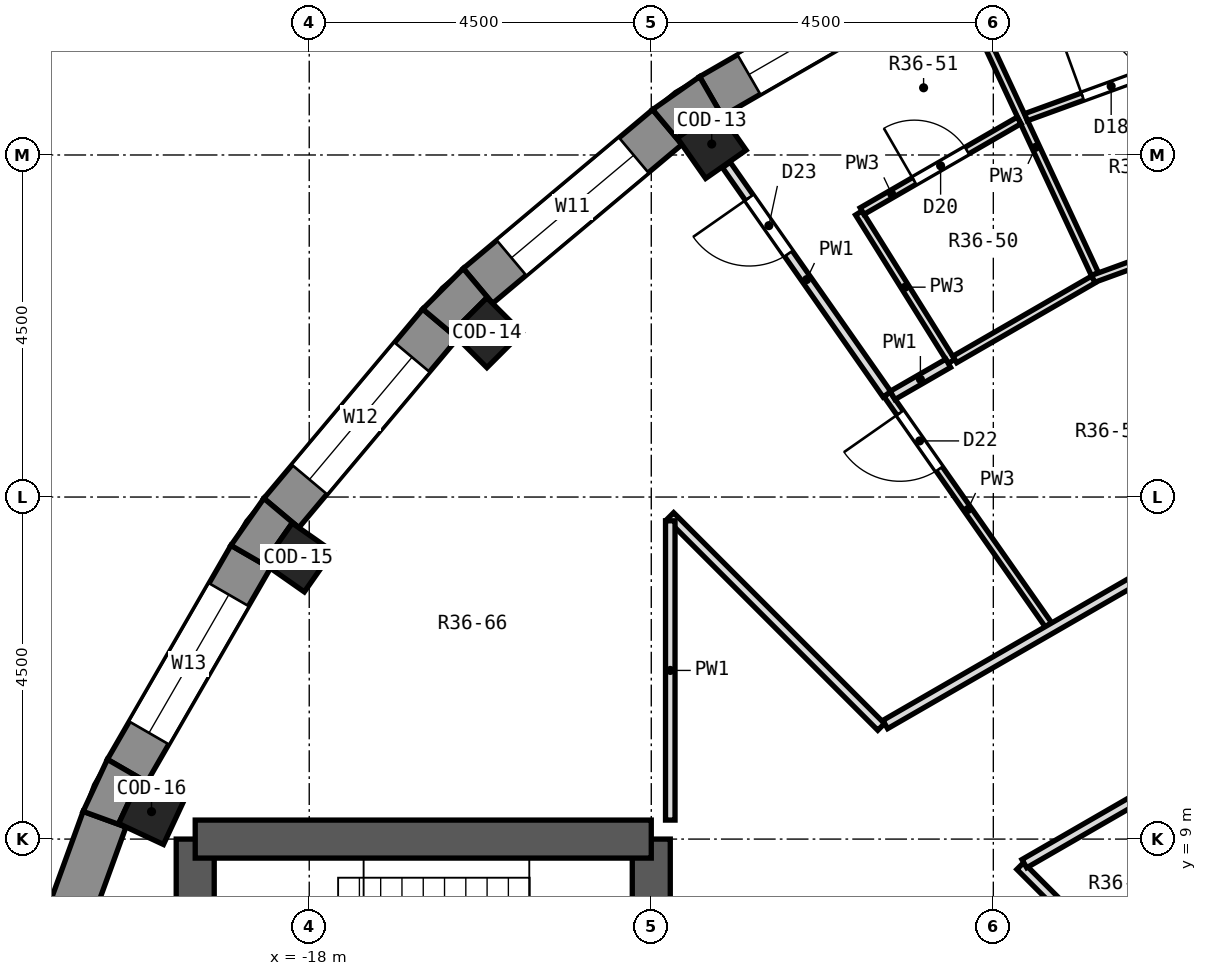
"""IFC4 building model, lengths in metres.
Left out: names, types, materials, properties, quantities, classifications, styles, units other than length and angle.
Written with IfcOpenShell. Run it as: python <this file> out.ifc"""

import sys

from ifc_helpers import new_model, si_unit, direction, frame, frame_2d, origin, origin_2d, place, context, subcontext, project, spatial, polyline, rectangle, outline, extrude, element, fill, save


model = new_model("IFC4")
c1 = context("Model", 3, precision=1e-05, world=origin(), true_north=direction((0.0, 1.0)))
c2 = subcontext(c1, "Body", "Model", "MODEL_VIEW")
j1 = project(units=[si_unit("LENGTHUNIT", "METRE"), si_unit("PLANEANGLEUNIT", "RADIAN")], contexts=[c1])
p1 = place(None, origin())
s1 = spatial("IfcSite", under=j1, at=p1, CompositionType="ELEMENT")
p2 = place(p1, origin())
s2 = spatial("IfcBuilding", under=s1, at=p2, CompositionType="ELEMENT")
p3 = place(p2, frame((0.0, 0.0, 259.4)))
s3 = spatial("IfcBuildingStorey", under=s2, at=p3, CompositionType="ELEMENT", Elevation=259.4)
for number, where, z_axis, x_axis in (
    (1, (-12.705, 18.144, 0.0), (0.0, 0.0, 1.0), (-0.574, 0.819, 0.0)),
    (2, (-15.662, 15.662, 0.0), (0.0, 0.0, 1.0), (-0.707, 0.707, 0.0)),
    (3, (-18.144, 12.705, 0.0), (0.0, 0.0, 1.0), (-0.819, 0.574, 0.0)),
    (4, (-20.075, 9.361, 0.0), (0.0, 0.0, 1.0), (-0.906, 0.423, 0.0)),
):
    element("IfcColumn", number, at=place(p3, frame(where, z_axis=z_axis, x_axis=x_axis)), inside=s3, PredefinedType="COLUMN", context=c2, shape_type="SweptSolid", body=[
        extrude(rectangle(XDim=0.65, YDim=0.65, at=origin_2d()), origin(), (0.0, 0.0, 1.0), 3.3),
    ])
p4 = place(p3, frame((-13.5, -9.0, 0.0), z_axis=(0.0, 0.0, 1.0), x_axis=(0.0, 1.0, 0.0)))
e5 = element("IfcWall", 5, at=p4, inside=s3, PredefinedType="SHEAR", context=c2, shape_type="SweptSolid", body=[
    extrude(rectangle(XDim=18.0, YDim=0.5, at=frame_2d((9.0, 0.0))), origin(), (0.0, 0.0, 1.0), 3.3),
])
p5 = place(p4, frame((15.4, 0.0, 0.0)))
e6 = element("IfcOpeningElement", 6, at=p5, cuts=e5, PredefinedType="OPENING", context=c2, shape_type="SweptSolid", body=[
    extrude(rectangle(XDim=1.2, YDim=2.1, at=frame_2d((0.6, 1.05))), frame((0.0, 0.262, 0.0), z_axis=(0.0, -1.0, 0.0), x_axis=(1.0, 0.0, 0.0)), (0.0, 0.0, 1.0), 0.524),
])
p6 = place(p4, frame((1.4, 0.0, 0.0)))
e7 = element("IfcOpeningElement", 7, at=p6, cuts=e5, PredefinedType="OPENING", context=c2, shape_type="SweptSolid", body=[
    extrude(rectangle(XDim=1.2, YDim=2.1, at=frame_2d((0.6, 1.05))), frame((0.0, 0.262, 0.0), z_axis=(0.0, -1.0, 0.0), x_axis=(1.0, 0.0, 0.0)), (0.0, 0.0, 1.0), 0.524),
])
p7 = place(p4, frame((7.5, 0.0, 0.0)))
e8 = element("IfcOpeningElement", 8, at=p7, cuts=e5, PredefinedType="OPENING", context=c2, shape_type="SweptSolid", body=[
    extrude(rectangle(XDim=3.0, YDim=2.4, at=frame_2d((1.5, 1.2))), frame((0.0, 0.262, 0.0), z_axis=(0.0, -1.0, 0.0), x_axis=(1.0, 0.0, 0.0)), (0.0, 0.0, 1.0), 0.524),
])
p8 = place(p3, frame((-19.5, -9.0, 0.0), z_axis=(0.0, 0.0, 1.0), x_axis=(0.0, 1.0, 0.0)))
e9 = element("IfcWall", 9, at=p8, inside=s3, PredefinedType="SHEAR", context=c2, shape_type="SweptSolid", body=[
    extrude(rectangle(XDim=18.0, YDim=0.5, at=frame_2d((9.0, 0.0))), origin(), (0.0, 0.0, 1.0), 3.3),
])
p9 = place(p8, frame((9.45, 0.0, 0.0)))
e10 = element("IfcOpeningElement", 10, at=p9, cuts=e9, PredefinedType="OPENING", context=c2, shape_type="SweptSolid", body=[
    extrude(rectangle(XDim=0.9, YDim=2.1, at=frame_2d((0.45, 1.05))), frame((0.0, 0.262, 0.0), z_axis=(0.0, -1.0, 0.0), x_axis=(1.0, 0.0, 0.0)), (0.0, 0.0, 1.0), 0.524),
])
p10 = place(p8, frame((7.65, 0.0, 0.0)))
e11 = element("IfcOpeningElement", 11, at=p10, cuts=e9, PredefinedType="OPENING", context=c2, shape_type="SweptSolid", body=[
    extrude(rectangle(XDim=0.9, YDim=2.1, at=frame_2d((0.45, 1.05))), frame((0.0, 0.262, 0.0), z_axis=(0.0, -1.0, 0.0), x_axis=(1.0, 0.0, 0.0)), (0.0, 0.0, 1.0), 0.524),
])
p11 = place(p3, frame((-13.5, 9.0, 0.0), z_axis=(0.0, 0.0, 1.0), x_axis=(-1.0, 0.0, 0.0)))
e12 = element("IfcWall", 12, at=p11, inside=s3, PredefinedType="SHEAR", context=c2, shape_type="SweptSolid", body=[
    extrude(rectangle(XDim=6.0, YDim=0.5, at=frame_2d((3.0, 0.0))), origin(), (0.0, 0.0, 1.0), 3.3),
])
p12 = place(p3, frame((-9.898, 20.396, 0.0), z_axis=(0.0, 0.0, 1.0), x_axis=(-0.866016800201, -0.500014901547, 0.0)))
e13 = element("IfcWall", 13, at=p12, inside=s3, PredefinedType="SOLIDWALL", context=c2, shape_type="SweptSolid", body=[
    extrude(rectangle(XDim=3.252, YDim=0.6, at=frame_2d((1.626, 0.0))), origin(), (0.0, 0.0, 1.0), 2.9),
])
p13 = place(p12, frame((0.576, 0.0, 0.9)))
e14 = element("IfcOpeningElement", 14, at=p13, cuts=e13, PredefinedType="OPENING", context=c2, shape_type="SweptSolid", body=[
    extrude(rectangle(XDim=2.1, YDim=1.8, at=frame_2d((1.05, 0.9))), frame((0.0, 0.312, 0.0), z_axis=(0.0, -1.0, 0.0), x_axis=(1.0, 0.0, 0.0)), (0.0, 0.0, 1.0), 0.624),
])
p14 = place(p3, frame((-13.29, 18.367, 0.0), z_axis=(0.0, 0.0, 1.0), x_axis=(-0.766056773982, -0.64277291405, 0.0)))
e15 = element("IfcWall", 15, at=p14, inside=s3, PredefinedType="SOLIDWALL", context=c2, shape_type="SweptSolid", body=[
    extrude(rectangle(XDim=3.252, YDim=0.6, at=frame_2d((1.626, 0.0))), origin(), (0.0, 0.0, 1.0), 2.9),
])
p15 = place(p14, frame((0.576, 0.0, 0.9)))
e16 = element("IfcOpeningElement", 16, at=p15, cuts=e15, PredefinedType="OPENING", context=c2, shape_type="SweptSolid", body=[
    extrude(rectangle(XDim=2.1, YDim=1.8, at=frame_2d((1.05, 0.9))), frame((0.0, 0.312, 0.0), z_axis=(0.0, -1.0, 0.0), x_axis=(1.0, 0.0, 0.0)), (0.0, 0.0, 1.0), 0.624),
])
p16 = place(p3, frame((-16.277, 15.781, 0.0), z_axis=(0.0, 0.0, 1.0), x_axis=(-0.64277291405, -0.766056773982, 0.0)))
e17 = element("IfcWall", 17, at=p16, inside=s3, PredefinedType="SOLIDWALL", context=c2, shape_type="SweptSolid", body=[
    extrude(rectangle(XDim=3.252, YDim=0.6, at=frame_2d((1.626, 0.0))), origin(), (0.0, 0.0, 1.0), 2.9),
])
p17 = place(p16, frame((0.576, 0.0, 0.9)))
e18 = element("IfcOpeningElement", 18, at=p17, cuts=e17, PredefinedType="OPENING", context=c2, shape_type="SweptSolid", body=[
    extrude(rectangle(XDim=2.1, YDim=1.8, at=frame_2d((1.05, 0.9))), frame((0.0, 0.312, 0.0), z_axis=(0.0, -1.0, 0.0), x_axis=(1.0, 0.0, 0.0)), (0.0, 0.0, 1.0), 0.624),
])
p18 = place(p3, frame((-18.77, 12.714, 0.0), z_axis=(0.0, 0.0, 1.0), x_axis=(-0.500014901547, -0.866016800201, 0.0)))
e19 = element("IfcWall", 19, at=p18, inside=s3, PredefinedType="SOLIDWALL", context=c2, shape_type="SweptSolid", body=[
    extrude(rectangle(XDim=3.252, YDim=0.6, at=frame_2d((1.626, 0.0))), origin(), (0.0, 0.0, 1.0), 2.9),
])
p19 = place(p18, frame((0.576, 0.0, 0.9)))
e20 = element("IfcOpeningElement", 20, at=p19, cuts=e19, PredefinedType="OPENING", context=c2, shape_type="SweptSolid", body=[
    extrude(rectangle(XDim=2.1, YDim=1.8, at=frame_2d((1.05, 0.9))), frame((0.0, 0.312, 0.0), z_axis=(0.0, -1.0, 0.0), x_axis=(1.0, 0.0, 0.0)), (0.0, 0.0, 1.0), 0.624),
])
p20 = place(p3, frame((-20.693, 9.262, 0.0), z_axis=(0.0, 0.0, 1.0), x_axis=(-0.342056509473, -0.939679383794, 0.0)))
e21 = element("IfcWall", 21, at=p20, inside=s3, PredefinedType="SOLIDWALL", context=c2, shape_type="SweptSolid", body=[
    extrude(rectangle(XDim=3.252, YDim=0.6, at=frame_2d((1.626, 0.0))), origin(), (0.0, 0.0, 1.0), 2.9),
])
p21 = place(p3, origin())
e22 = element("IfcWall", 22, at=p21, inside=s3, PredefinedType="SOLIDWALL", context=c2, shape_type="SweptSolid", body=[
    extrude(outline(polyline([(-12.864, 19.03), (-13.482, 18.597), (-13.097, 18.137), (-13.157, 18.224), (-12.625, 18.597), (-12.564, 18.51), (-12.864, 19.03)])), origin(), (0.0, 0.0, 1.0), 2.9),
])
p22 = place(p3, origin())
e23 = element("IfcWall", 23, at=p22, inside=s3, PredefinedType="SOLIDWALL", context=c2, shape_type="SweptSolid", body=[
    extrude(outline(polyline([(-16.507, 15.973), (-16.047, 15.588), (-16.122, 15.662), (-15.662, 16.122), (-15.588, 16.047), (-15.973, 16.507), (-16.507, 15.973)])), origin(), (0.0, 0.0, 1.0), 2.9),
])
p23 = place(p3, origin())
e24 = element("IfcWall", 24, at=p23, inside=s3, PredefinedType="SOLIDWALL", context=c2, shape_type="SweptSolid", body=[
    extrude(outline(polyline([(-19.03, 12.864), (-18.51, 12.564), (-18.597, 12.625), (-18.224, 13.157), (-18.137, 13.097), (-18.597, 13.482), (-19.03, 12.864)])), origin(), (0.0, 0.0, 1.0), 2.9),
])
p24 = place(p3, origin())
e25 = element("IfcWall", 25, at=p24, inside=s3, PredefinedType="SOLIDWALL", context=c2, shape_type="SweptSolid", body=[
    extrude(outline(polyline([(-20.656, 10.048), (-20.975, 9.364), (-20.411, 9.159), (-20.507, 9.204), (-20.232, 9.793), (-20.136, 9.748), (-20.656, 10.048)])), origin(), (0.0, 0.0, 1.0), 2.9),
])
p25 = place(p3, frame((-9.22, 19.771, 0.0), z_axis=(0.0, 0.0, 1.0), x_axis=(0.422606093897, -0.906313460896, 0.0)))
e26 = element("IfcWall", 26, at=p25, inside=s3, PredefinedType="PARTITIONING", context=c2, shape_type="SweptSolid", body=[
    extrude(rectangle(XDim=3.684, YDim=0.1, at=frame_2d((1.842, 0.0))), origin(), (0.0, 0.0, 1.0), 2.9),
])
p26 = place(p3, frame((-10.77, 17.237, 0.0), z_axis=(0.0, 0.0, 1.0), x_axis=(0.529960807047, -0.848022135911, 0.0)))
e27 = element("IfcWall", 27, at=p26, inside=s3, PredefinedType="PARTITIONING", context=c2, shape_type="SweptSolid", body=[
    extrude(rectangle(XDim=2.302, YDim=0.1, at=frame_2d((1.151, 0.0))), origin(), (0.0, 0.0, 1.0), 2.9),
])
p27 = place(p3, frame((-10.399, 14.852, 0.0), z_axis=(0.0, 0.0, 1.0), x_axis=(0.573661423556, -0.819092529037, 0.0)))
e28 = element("IfcWall", 28, at=p27, inside=s3, PredefinedType="PARTITIONING", context=c2, shape_type="SweptSolid", body=[
    extrude(rectangle(XDim=3.703, YDim=0.1, at=frame_2d((1.852, 0.0))), origin(), (0.0, 0.0, 1.0), 2.9),
])
p28 = place(p27, frame((0.299, 0.0, 0.0)))
e29 = element("IfcOpeningElement", 29, at=p28, cuts=e28, PredefinedType="OPENING", context=c2, shape_type="SweptSolid", body=[
    extrude(rectangle(XDim=0.9, YDim=2.1, at=frame_2d((0.45, 1.05))), frame((0.0, 0.062, 0.0), z_axis=(0.0, -1.0, 0.0), x_axis=(1.0, 0.0, 0.0)), (0.0, 0.0, 1.0), 0.124),
])
p29 = place(p3, frame((-12.513, 17.87, 0.0), z_axis=(0.0, 0.0, 1.0), x_axis=(0.573564635471, -0.819160307228, 0.0)))
e30 = element("IfcWall", 30, at=p29, inside=s3, PredefinedType="PARTITIONING", context=c2, shape_type="SweptSolid", body=[
    extrude(rectangle(XDim=3.684, YDim=0.125, at=frame_2d((1.842, 0.0))), origin(), (0.0, 0.0, 1.0), 2.9),
])
p30 = place(p29, frame((0.526, 0.0, 0.0)))
e31 = element("IfcOpeningElement", 31, at=p30, cuts=e30, PredefinedType="OPENING", context=c2, shape_type="SweptSolid", body=[
    extrude(rectangle(XDim=0.9, YDim=2.1, at=frame_2d((0.45, 1.05))), frame((0.0, 0.074, 0.0), z_axis=(0.0, -1.0, 0.0), x_axis=(1.0, 0.0, 0.0)), (0.0, 0.0, 1.0), 0.149),
])
p31 = place(p3, frame((-13.25, 13.25, 0.0), z_axis=(0.0, 0.0, 1.0), x_axis=(0.707106781187, -0.707106781187, 0.0)))
e32 = element("IfcWall", 32, at=p31, inside=s3, PredefinedType="PARTITIONING", context=c2, shape_type="SweptSolid", body=[
    extrude(rectangle(XDim=3.923, YDim=0.125, at=frame_2d((1.961, 0.0))), origin(), (0.0, 0.0, 1.0), 2.9),
])
p32 = place(p3, frame((-8.646, 8.646, 0.0), z_axis=(0.0, 0.0, 1.0), x_axis=(0.707106781187, -0.707106781187, 0.0)))
e33 = element("IfcWall", 33, at=p32, inside=s3, PredefinedType="PARTITIONING", context=c2, shape_type="SweptSolid", body=[
    extrude(rectangle(XDim=2.785, YDim=0.125, at=frame_2d((1.393, 0.0))), origin(), (0.0, 0.0, 1.0), 2.9),
])
p33 = place(p3, frame((-7.689, 16.37, 0.0), z_axis=(0.0, 0.0, 1.0), x_axis=(0.939680214162, 0.342054228323, 0.0)))
e34 = element("IfcWall", 34, at=p33, inside=s3, PredefinedType="PARTITIONING", context=c2, shape_type="SweptSolid", body=[
    extrude(rectangle(XDim=2.205, YDim=0.1, at=frame_2d((1.103, 0.0))), origin(), (0.0, 0.0, 1.0), 2.9),
])
p34 = place(p3, frame((-8.57, 18.497, 0.0), z_axis=(0.0, 0.0, 1.0), x_axis=(0.939715724906, 0.341956658606, 0.0)))
e35 = element("IfcWall", 35, at=p34, inside=s3, PredefinedType="PARTITIONING", context=c2, shape_type="SweptSolid", body=[
    extrude(rectangle(XDim=2.386, YDim=0.1, at=frame_2d((1.193, 0.0))), origin(), (0.0, 0.0, 1.0), 2.9),
])
p35 = place(p34, frame((0.792, 0.0, 0.0)))
e36 = element("IfcOpeningElement", 36, at=p35, cuts=e35, PredefinedType="OPENING", context=c2, shape_type="SweptSolid", body=[
    extrude(rectangle(XDim=0.8, YDim=2.1, at=frame_2d((0.4, 1.05))), frame((0.0, 0.062, 0.0), z_axis=(0.0, -1.0, 0.0), x_axis=(1.0, 0.0, 0.0)), (0.0, 0.0, 1.0), 0.124),
])
p36 = place(p3, frame((-8.592, 8.677, 0.0), z_axis=(0.0, 0.0, 1.0), x_axis=(0.866094986022, 0.499879460657, 0.0)))
e37 = element("IfcWall", 37, at=p36, inside=s3, PredefinedType="PARTITIONING", context=c2, shape_type="SweptSolid", body=[
    extrude(rectangle(XDim=6.192, YDim=0.125, at=frame_2d((3.096, 0.0))), origin(), (0.0, 0.0, 1.0), 2.9),
])
p37 = place(p36, frame((2.552, 0.0, 0.0)))
e38 = element("IfcOpeningElement", 38, at=p37, cuts=e37, PredefinedType="OPENING", context=c2, shape_type="SweptSolid", body=[
    extrude(rectangle(XDim=1.0, YDim=2.1, at=frame_2d((0.5, 1.05))), frame((0.0, 0.074, 0.0), z_axis=(0.0, -1.0, 0.0), x_axis=(1.0, 0.0, 0.0)), (0.0, 0.0, 1.0), 0.149),
])
p38 = place(p3, frame((-10.422, 10.507, 0.0), z_axis=(0.0, 0.0, 1.0), x_axis=(0.866068111199, 0.499926021291, 0.0)))
e39 = element("IfcWall", 39, at=p38, inside=s3, PredefinedType="PARTITIONING", context=c2, shape_type="SweptSolid", body=[
    extrude(rectangle(XDim=7.544, YDim=0.125, at=frame_2d((3.772, 0.0))), origin(), (0.0, 0.0, 1.0), 2.9),
])
p39 = place(p3, frame((-9.507, 15.31, 0.0), z_axis=(0.0, 0.0, 1.0), x_axis=(0.86604260665, 0.49997020258, 0.0)))
e40 = element("IfcWall", 40, at=p39, inside=s3, PredefinedType="PARTITIONING", context=c2, shape_type="SweptSolid", body=[
    extrude(rectangle(XDim=2.104, YDim=0.1, at=frame_2d((1.052, 0.0))), origin(), (0.0, 0.0, 1.0), 2.9),
])
p40 = place(p3, frame((-10.326, 14.837, 0.0), z_axis=(0.0, 0.0, 1.0), x_axis=(0.866031754707, 0.499988999718, 0.0)))
e41 = element("IfcWall", 41, at=p40, inside=s3, PredefinedType="PARTITIONING", context=c2, shape_type="SweptSolid", body=[
    extrude(rectangle(XDim=0.846, YDim=0.125, at=frame_2d((0.423, 0.0))), origin(), (0.0, 0.0, 1.0), 2.9),
])
p41 = place(p3, frame((-10.727, 17.262, 0.0), z_axis=(0.0, 0.0, 1.0), x_axis=(0.866011787705, 0.500023583, 0.0)))
e42 = element("IfcWall", 42, at=p41, inside=s3, PredefinedType="PARTITIONING", context=c2, shape_type="SweptSolid", body=[
    extrude(rectangle(XDim=2.386, YDim=0.1, at=frame_2d((1.193, 0.0))), origin(), (0.0, 0.0, 1.0), 2.9),
])
p42 = place(p41, frame((0.793, 0.0, 0.0)))
e43 = element("IfcOpeningElement", 43, at=p42, cuts=e42, PredefinedType="OPENING", context=c2, shape_type="SweptSolid", body=[
    extrude(rectangle(XDim=0.8, YDim=2.1, at=frame_2d((0.4, 1.05))), frame((0.0, 0.062, 0.0), z_axis=(0.0, -1.0, 0.0), x_axis=(1.0, 0.0, 0.0)), (0.0, 0.0, 1.0), 0.124),
])
p43 = place(p3, frame((-13.25, 9.25, 0.0), z_axis=(0.0, 0.0, 1.0), x_axis=(0.0, 1.0, 0.0)))
e44 = element("IfcWall", 44, at=p43, inside=s3, PredefinedType="PARTITIONING", context=c2, shape_type="SweptSolid", body=[
    extrude(rectangle(XDim=3.938, YDim=0.125, at=frame_2d((1.969, 0.0))), origin(), (0.0, 0.0, 1.0), 2.9),
])
p44 = place(p13, origin())
e45 = element("IfcWindow", 45, at=p44, inside=s3, PartitioningType="SINGLE_PANEL", PredefinedType="WINDOW", context=c2, shape_type="SweptSolid", body=[
    extrude(rectangle(XDim=2.1, YDim=1.8, at=frame_2d((1.05, 0.9))), frame((0.0, 0.18, 0.0), z_axis=(0.0, -1.0, 0.0), x_axis=(1.0, 0.0, 0.0)), (0.0, 0.0, 1.0), 0.06),
])
fill(e14, e45)
p45 = place(p15, origin())
e46 = element("IfcWindow", 46, at=p45, inside=s3, PartitioningType="SINGLE_PANEL", PredefinedType="WINDOW", context=c2, shape_type="SweptSolid", body=[
    extrude(rectangle(XDim=2.1, YDim=1.8, at=frame_2d((1.05, 0.9))), frame((0.0, 0.18, 0.0), z_axis=(0.0, -1.0, 0.0), x_axis=(1.0, 0.0, 0.0)), (0.0, 0.0, 1.0), 0.06),
])
fill(e16, e46)
p46 = place(p17, origin())
e47 = element("IfcWindow", 47, at=p46, inside=s3, PartitioningType="SINGLE_PANEL", PredefinedType="WINDOW", context=c2, shape_type="SweptSolid", body=[
    extrude(rectangle(XDim=2.1, YDim=1.8, at=frame_2d((1.05, 0.9))), frame((0.0, 0.18, 0.0), z_axis=(0.0, -1.0, 0.0), x_axis=(1.0, 0.0, 0.0)), (0.0, 0.0, 1.0), 0.06),
])
fill(e18, e47)
p47 = place(p19, origin())
e48 = element("IfcWindow", 48, at=p47, inside=s3, PartitioningType="SINGLE_PANEL", PredefinedType="WINDOW", context=c2, shape_type="SweptSolid", body=[
    extrude(rectangle(XDim=2.1, YDim=1.8, at=frame_2d((1.05, 0.9))), frame((0.0, 0.18, 0.0), z_axis=(0.0, -1.0, 0.0), x_axis=(1.0, 0.0, 0.0)), (0.0, 0.0, 1.0), 0.06),
])
fill(e20, e48)
p48 = place(p35, origin())
e49 = element("IfcDoor", 49, at=p48, inside=s3, OperationType="SINGLE_SWING_LEFT", PredefinedType="DOOR", context=c2, shape_type="SweptSolid", body=[
    extrude(rectangle(XDim=0.8, YDim=2.1, at=frame_2d((0.4, 1.05))), frame((0.0, 0.025, 0.0), z_axis=(0.0, -1.0, 0.0), x_axis=(1.0, 0.0, 0.0)), (0.0, 0.0, 1.0), 0.05),
])
fill(e36, e49)
p49 = place(p42, origin())
e50 = element("IfcDoor", 50, at=p49, inside=s3, OperationType="SINGLE_SWING_LEFT", PredefinedType="DOOR", context=c2, shape_type="SweptSolid", body=[
    extrude(rectangle(XDim=0.8, YDim=2.1, at=frame_2d((0.4, 1.05))), frame((0.0, 0.025, 0.0), z_axis=(0.0, -1.0, 0.0), x_axis=(1.0, 0.0, 0.0)), (0.0, 0.0, 1.0), 0.05),
])
fill(e43, e50)
p50 = place(p28, frame((0.9, 0.0, 0.0), z_axis=(0.0, 0.0, 1.0), x_axis=(-1.0, 0.0, 0.0)))
e51 = element("IfcDoor", 51, at=p50, inside=s3, OperationType="SINGLE_SWING_RIGHT", PredefinedType="DOOR", context=c2, shape_type="SweptSolid", body=[
    extrude(rectangle(XDim=0.9, YDim=2.1, at=frame_2d((0.45, 1.05))), frame((0.0, 0.025, 0.0), z_axis=(0.0, -1.0, 0.0), x_axis=(1.0, 0.0, 0.0)), (0.0, 0.0, 1.0), 0.05),
])
fill(e29, e51)
p51 = place(p30, frame((0.9, 0.0, 0.0), z_axis=(0.0, 0.0, 1.0), x_axis=(-1.0, 0.0, 0.0)))
e52 = element("IfcDoor", 52, at=p51, inside=s3, OperationType="SINGLE_SWING_RIGHT", PredefinedType="DOOR", context=c2, shape_type="SweptSolid", body=[
    extrude(rectangle(XDim=0.9, YDim=2.1, at=frame_2d((0.45, 1.05))), frame((0.0, 0.025, 0.0), z_axis=(0.0, -1.0, 0.0), x_axis=(1.0, 0.0, 0.0)), (0.0, 0.0, 1.0), 0.05),
])
fill(e31, e52)
save(model, sys.argv[1])
